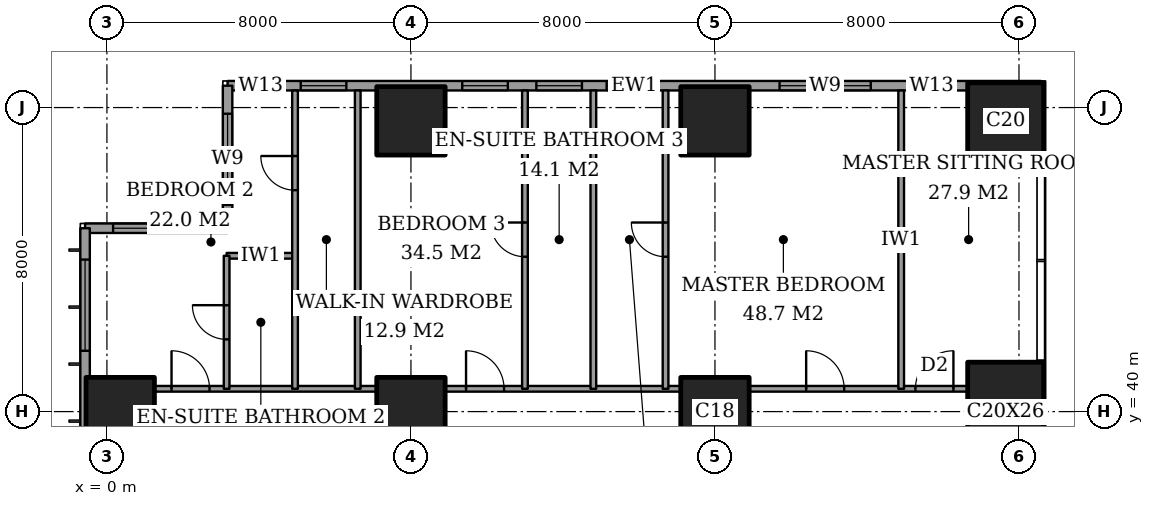
"""IFC4 building model, lengths in metres.
Left out: names, types, materials, properties, quantities, classifications, styles, units other than length and angle.
Written with IfcOpenShell. Run it as: python <this file> out.ifc"""

import sys

from ifc_helpers import new_model, si_unit, direction, frame, frame_2d, origin, origin_2d, place, context, subcontext, project, spatial, rectangle, extrude, element, fill, save


model = new_model("IFC4")
c1 = context("Model", 3, precision=1e-05, world=origin(), true_north=direction((0.0, 1.0)))
c2 = subcontext(c1, "Body", "Model", "MODEL_VIEW")
j1 = project(units=[si_unit("LENGTHUNIT", "METRE"), si_unit("PLANEANGLEUNIT", "RADIAN")], contexts=[c1])
p1 = place(None, origin())
s1 = spatial("IfcSite", under=j1, at=p1, CompositionType="ELEMENT")
p2 = place(p1, origin())
s2 = spatial("IfcBuilding", under=s1, at=p2, CompositionType="ELEMENT")
p3 = place(p2, frame((0.0, 0.0, 211.0)))
s3 = spatial("IfcBuildingStorey", under=s2, at=p3, CompositionType="ELEMENT", Elevation=211.0)
for number, where, z_axis, x_axis in (
    (1, (0.35, 40.0, 0.0), (0.0, 0.0, 1.0), (1.0, 0.0, 0.0)),
    (2, (8.0, 40.0, 0.0), (0.0, 0.0, 1.0), (1.0, 0.0, 0.0)),
    (3, (8.0, 47.65, 0.0), (0.0, 0.0, 1.0), (1.0, 0.0, 0.0)),
    (4, (16.0, 40.0, 0.0), (0.0, 0.0, 1.0), (1.0, 0.0, 0.0)),
    (5, (16.0, 47.65, 0.0), (0.0, 0.0, 1.0), (1.0, 0.0, 0.0)),
):
    element("IfcColumn", number, at=place(p3, frame(where, z_axis=z_axis, x_axis=x_axis)), inside=s3, PredefinedType="COLUMN", context=c2, shape_type="SweptSolid", body=[
        extrude(rectangle(XDim=1.8, YDim=1.8, at=origin_2d()), origin(), (0.0, 0.0, 1.0), 3.6),
    ])
p4 = place(p3, frame((23.65, 40.0, 0.0), z_axis=(0.0, 0.0, 1.0), x_axis=(1.0, 0.0, 0.0)))
e6 = element("IfcColumn", 6, at=p4, inside=s3, PredefinedType="COLUMN", context=c2, shape_type="SweptSolid", body=[
    extrude(rectangle(XDim=2.0, YDim=2.6, at=origin_2d()), origin(), (0.0, 0.0, 1.0), 3.6),
])
p5 = place(p3, frame((23.65, 47.65, 0.0), z_axis=(0.0, 0.0, 1.0), x_axis=(1.0, 0.0, 0.0)))
e7 = element("IfcColumn", 7, at=p5, inside=s3, PredefinedType="COLUMN", context=c2, shape_type="SweptSolid", body=[
    extrude(rectangle(XDim=2.0, YDim=2.0, at=origin_2d()), origin(), (0.0, 0.0, 1.0), 3.6),
])
p6 = place(p3, frame((24.575, 48.575, 0.0), z_axis=(0.0, 0.0, 1.0), x_axis=(-1.0, 0.0, 0.0)))
e8 = element("IfcWall", 8, at=p6, inside=s3, PredefinedType="SOLIDWALL", context=c2, shape_type="SweptSolid", body=[
    extrude(rectangle(XDim=21.4, YDim=0.25, at=frame_2d((10.7, 0.0))), origin(), (0.0, 0.0, 1.0), 3.6),
])
p7 = place(p6, frame((2.275, 0.0, 0.2)))
e9 = element("IfcOpeningElement", 9, at=p7, cuts=e8, PredefinedType="OPENING", context=c2, shape_type="SweptSolid", body=[
    extrude(rectangle(XDim=1.2, YDim=2.4, at=frame_2d((0.6, 1.2))), frame((0.0, 0.135, 0.0), z_axis=(0.0, -1.0, 0.0), x_axis=(1.0, 0.0, 0.0)), (0.0, 0.0, 1.0), 0.27),
])
p8 = place(p6, frame((4.475, 0.0, 0.2)))
e10 = element("IfcOpeningElement", 10, at=p8, cuts=e8, PredefinedType="OPENING", context=c2, shape_type="SweptSolid", body=[
    extrude(rectangle(XDim=2.4, YDim=2.4, at=frame_2d((1.2, 1.2))), frame((0.0, 0.135, 0.0), z_axis=(0.0, -1.0, 0.0), x_axis=(1.0, 0.0, 0.0)), (0.0, 0.0, 1.0), 0.27),
])
p9 = place(p6, frame((10.225, 0.0, 0.2)))
e11 = element("IfcOpeningElement", 11, at=p9, cuts=e8, PredefinedType="OPENING", context=c2, shape_type="SweptSolid", body=[
    extrude(rectangle(XDim=1.2, YDim=2.4, at=frame_2d((0.6, 1.2))), frame((0.0, 0.135, 0.0), z_axis=(0.0, -1.0, 0.0), x_axis=(1.0, 0.0, 0.0)), (0.0, 0.0, 1.0), 0.27),
])
p10 = place(p6, frame((12.075, 0.0, 0.2)))
e12 = element("IfcOpeningElement", 12, at=p10, cuts=e8, PredefinedType="OPENING", context=c2, shape_type="SweptSolid", body=[
    extrude(rectangle(XDim=1.2, YDim=2.4, at=frame_2d((0.6, 1.2))), frame((0.0, 0.135, 0.0), z_axis=(0.0, -1.0, 0.0), x_axis=(1.0, 0.0, 0.0)), (0.0, 0.0, 1.0), 0.27),
])
p11 = place(p6, frame((14.025, 0.0, 0.2)))
e13 = element("IfcOpeningElement", 13, at=p11, cuts=e8, PredefinedType="OPENING", context=c2, shape_type="SweptSolid", body=[
    extrude(rectangle(XDim=1.2, YDim=2.4, at=frame_2d((0.6, 1.2))), frame((0.0, 0.135, 0.0), z_axis=(0.0, -1.0, 0.0), x_axis=(1.0, 0.0, 0.0)), (0.0, 0.0, 1.0), 0.27),
])
p12 = place(p6, frame((18.275, 0.0, 0.2)))
e14 = element("IfcOpeningElement", 14, at=p12, cuts=e8, PredefinedType="OPENING", context=c2, shape_type="SweptSolid", body=[
    extrude(rectangle(XDim=1.2, YDim=2.4, at=frame_2d((0.6, 1.2))), frame((0.0, 0.135, 0.0), z_axis=(0.0, -1.0, 0.0), x_axis=(1.0, 0.0, 0.0)), (0.0, 0.0, 1.0), 0.27),
])
p13 = place(p6, frame((19.925, 0.0, 0.2)))
e15 = element("IfcOpeningElement", 15, at=p13, cuts=e8, PredefinedType="OPENING", context=c2, shape_type="SweptSolid", body=[
    extrude(rectangle(XDim=1.2, YDim=2.4, at=frame_2d((0.6, 1.2))), frame((0.0, 0.135, 0.0), z_axis=(0.0, -1.0, 0.0), x_axis=(1.0, 0.0, 0.0)), (0.0, 0.0, 1.0), 0.27),
])
p14 = place(p3, frame((3.175, 48.575, 0.0), z_axis=(0.0, 0.0, 1.0), x_axis=(0.0, -1.0, 0.0)))
e16 = element("IfcWall", 16, at=p14, inside=s3, PredefinedType="SOLIDWALL", context=c2, shape_type="SweptSolid", body=[
    extrude(rectangle(XDim=3.75, YDim=0.25, at=frame_2d((1.875, 0.0))), origin(), (0.0, 0.0, 1.0), 3.6),
])
p15 = place(p14, frame((0.738, 0.0, 0.2)))
e17 = element("IfcOpeningElement", 17, at=p15, cuts=e16, PredefinedType="OPENING", context=c2, shape_type="SweptSolid", body=[
    extrude(rectangle(XDim=2.4, YDim=2.4, at=frame_2d((1.2, 1.2))), frame((0.0, 0.135, 0.0), z_axis=(0.0, -1.0, 0.0), x_axis=(1.0, 0.0, 0.0)), (0.0, 0.0, 1.0), 0.27),
])
p16 = place(p3, frame((3.175, 44.825, 0.0), z_axis=(0.0, 0.0, 1.0), x_axis=(-1.0, 0.0, 0.0)))
e18 = element("IfcWall", 18, at=p16, inside=s3, PredefinedType="SOLIDWALL", context=c2, shape_type="SweptSolid", body=[
    extrude(rectangle(XDim=3.75, YDim=0.25, at=frame_2d((1.875, 0.0))), origin(), (0.0, 0.0, 1.0), 3.6),
])
p17 = place(p16, frame((0.613, 0.0, 0.2)))
e19 = element("IfcOpeningElement", 19, at=p17, cuts=e18, PredefinedType="OPENING", context=c2, shape_type="SweptSolid", body=[
    extrude(rectangle(XDim=2.4, YDim=2.4, at=frame_2d((1.2, 1.2))), frame((0.0, 0.135, 0.0), z_axis=(0.0, -1.0, 0.0), x_axis=(1.0, 0.0, 0.0)), (0.0, 0.0, 1.0), 0.27),
])
p18 = place(p3, frame((-0.575, 44.825, 0.0), z_axis=(0.0, 0.0, 1.0), x_axis=(0.0, -1.0, 0.0)))
e20 = element("IfcWall", 20, at=p18, inside=s3, PredefinedType="SOLIDWALL", context=c2, shape_type="SweptSolid", body=[
    extrude(rectangle(XDim=41.65, YDim=0.25, at=frame_2d((20.825, 0.0))), origin(), (0.0, 0.0, 1.0), 3.6),
])
p19 = place(p18, frame((0.825, 0.0, 0.2)))
e21 = element("IfcOpeningElement", 21, at=p19, cuts=e20, PredefinedType="OPENING", context=c2, shape_type="SweptSolid", body=[
    extrude(rectangle(XDim=2.4, YDim=2.4, at=frame_2d((1.2, 1.2))), frame((0.0, 0.135, 0.0), z_axis=(0.0, -1.0, 0.0), x_axis=(1.0, 0.0, 0.0)), (0.0, 0.0, 1.0), 0.27),
])
p20 = place(p18, frame((6.05, 0.0, 0.2)))
e22 = element("IfcOpeningElement", 22, at=p20, cuts=e20, PredefinedType="OPENING", context=c2, shape_type="SweptSolid", body=[
    extrude(rectangle(XDim=1.2, YDim=2.4, at=frame_2d((0.6, 1.2))), frame((0.0, 0.135, 0.0), z_axis=(0.0, -1.0, 0.0), x_axis=(1.0, 0.0, 0.0)), (0.0, 0.0, 1.0), 0.27),
])
p21 = place(p18, frame((8.225, 0.0, 0.2)))
e23 = element("IfcOpeningElement", 23, at=p21, cuts=e20, PredefinedType="OPENING", context=c2, shape_type="SweptSolid", body=[
    extrude(rectangle(XDim=2.4, YDim=2.4, at=frame_2d((1.2, 1.2))), frame((0.0, 0.135, 0.0), z_axis=(0.0, -1.0, 0.0), x_axis=(1.0, 0.0, 0.0)), (0.0, 0.0, 1.0), 0.27),
])
p22 = place(p18, frame((15.625, 0.0, 0.2)))
e24 = element("IfcOpeningElement", 24, at=p22, cuts=e20, PredefinedType="OPENING", context=c2, shape_type="SweptSolid", body=[
    extrude(rectangle(XDim=2.4, YDim=2.4, at=frame_2d((1.2, 1.2))), frame((0.0, 0.135, 0.0), z_axis=(0.0, -1.0, 0.0), x_axis=(1.0, 0.0, 0.0)), (0.0, 0.0, 1.0), 0.27),
])
p23 = place(p18, frame((23.625, 0.0, 0.2)))
e25 = element("IfcOpeningElement", 25, at=p23, cuts=e20, PredefinedType="OPENING", context=c2, shape_type="SweptSolid", body=[
    extrude(rectangle(XDim=2.4, YDim=2.4, at=frame_2d((1.2, 1.2))), frame((0.0, 0.135, 0.0), z_axis=(0.0, -1.0, 0.0), x_axis=(1.0, 0.0, 0.0)), (0.0, 0.0, 1.0), 0.27),
])
p24 = place(p18, frame((30.775, 0.0, 0.2)))
e26 = element("IfcOpeningElement", 26, at=p24, cuts=e20, PredefinedType="OPENING", context=c2, shape_type="SweptSolid", body=[
    extrude(rectangle(XDim=2.4, YDim=2.4, at=frame_2d((1.2, 1.2))), frame((0.0, 0.135, 0.0), z_axis=(0.0, -1.0, 0.0), x_axis=(1.0, 0.0, 0.0)), (0.0, 0.0, 1.0), 0.27),
])
p25 = place(p18, frame((34.55, 0.0, 0.2)))
e27 = element("IfcOpeningElement", 27, at=p25, cuts=e20, PredefinedType="OPENING", context=c2, shape_type="SweptSolid", body=[
    extrude(rectangle(XDim=1.2, YDim=2.4, at=frame_2d((0.6, 1.2))), frame((0.0, 0.135, 0.0), z_axis=(0.0, -1.0, 0.0), x_axis=(1.0, 0.0, 0.0)), (0.0, 0.0, 1.0), 0.27),
])
p26 = place(p18, frame((38.425, 0.0, 0.2)))
e28 = element("IfcOpeningElement", 28, at=p26, cuts=e20, PredefinedType="OPENING", context=c2, shape_type="SweptSolid", body=[
    extrude(rectangle(XDim=2.4, YDim=2.4, at=frame_2d((1.2, 1.2))), frame((0.0, 0.135, 0.0), z_axis=(0.0, -1.0, 0.0), x_axis=(1.0, 0.0, 0.0)), (0.0, 0.0, 1.0), 0.27),
])
p27 = place(p3, frame((1.25, 40.6, 0.0), z_axis=(0.0, 0.0, 1.0), x_axis=(1.0, 0.0, 0.0)))
e29 = element("IfcWall", 29, at=p27, inside=s3, PredefinedType="PARTITIONING", context=c2, shape_type="SweptSolid", body=[
    extrude(rectangle(XDim=5.85, YDim=0.15, at=frame_2d((2.925, 0.0))), origin(), (0.0, 0.0, 1.0), 3.35),
])
p28 = place(p27, frame((0.45, 0.0, 0.0)))
e30 = element("IfcOpeningElement", 30, at=p28, cuts=e29, PredefinedType="OPENING", context=c2, shape_type="SweptSolid", body=[
    extrude(rectangle(XDim=1.0, YDim=2.1, at=frame_2d((0.5, 1.05))), frame((0.0, 0.085, 0.0), z_axis=(0.0, -1.0, 0.0), x_axis=(1.0, 0.0, 0.0)), (0.0, 0.0, 1.0), 0.17),
])
p29 = place(p3, frame((8.9, 40.6, 0.0), z_axis=(0.0, 0.0, 1.0), x_axis=(1.0, 0.0, 0.0)))
e31 = element("IfcWall", 31, at=p29, inside=s3, PredefinedType="PARTITIONING", context=c2, shape_type="SweptSolid", body=[
    extrude(rectangle(XDim=6.2, YDim=0.15, at=frame_2d((3.1, 0.0))), origin(), (0.0, 0.0, 1.0), 3.35),
])
p30 = place(p29, frame((0.55, 0.0, 0.0)))
e32 = element("IfcOpeningElement", 32, at=p30, cuts=e31, PredefinedType="OPENING", context=c2, shape_type="SweptSolid", body=[
    extrude(rectangle(XDim=1.0, YDim=2.1, at=frame_2d((0.5, 1.05))), frame((0.0, 0.085, 0.0), z_axis=(0.0, -1.0, 0.0), x_axis=(1.0, 0.0, 0.0)), (0.0, 0.0, 1.0), 0.17),
])
p31 = place(p3, frame((16.9, 40.6, 0.0), z_axis=(0.0, 0.0, 1.0), x_axis=(1.0, 0.0, 0.0)))
e33 = element("IfcWall", 33, at=p31, inside=s3, PredefinedType="PARTITIONING", context=c2, shape_type="SweptSolid", body=[
    extrude(rectangle(XDim=5.75, YDim=0.15, at=frame_2d((2.875, 0.0))), origin(), (0.0, 0.0, 1.0), 3.35),
])
p32 = place(p31, frame((1.5, 0.0, 0.0)))
e34 = element("IfcOpeningElement", 34, at=p32, cuts=e33, PredefinedType="OPENING", context=c2, shape_type="SweptSolid", body=[
    extrude(rectangle(XDim=1.0, YDim=2.1, at=frame_2d((0.5, 1.05))), frame((0.0, 0.085, 0.0), z_axis=(0.0, -1.0, 0.0), x_axis=(1.0, 0.0, 0.0)), (0.0, 0.0, 1.0), 0.17),
])
p33 = place(p31, frame((4.375, 0.0, 0.0)))
e35 = element("IfcOpeningElement", 35, at=p33, cuts=e33, PredefinedType="OPENING", context=c2, shape_type="SweptSolid", body=[
    extrude(rectangle(XDim=1.0, YDim=2.1, at=frame_2d((0.5, 1.05))), frame((0.0, 0.085, 0.0), z_axis=(0.0, -1.0, 0.0), x_axis=(1.0, 0.0, 0.0)), (0.0, 0.0, 1.0), 0.17),
])
p34 = place(p3, frame((3.15, 44.1, 0.0), z_axis=(0.0, 0.0, 1.0), x_axis=(1.0, 0.0, 0.0)))
e36 = element("IfcWall", 36, at=p34, inside=s3, PredefinedType="PARTITIONING", context=c2, shape_type="SweptSolid", body=[
    extrude(rectangle(XDim=1.8, YDim=0.15, at=frame_2d((0.9, 0.0))), origin(), (0.0, 0.0, 1.0), 3.35),
])
p35 = place(p3, frame((3.15, 40.6, 0.0), z_axis=(0.0, 0.0, 1.0), x_axis=(0.0, 1.0, 0.0)))
e37 = element("IfcWall", 37, at=p35, inside=s3, PredefinedType="PARTITIONING", context=c2, shape_type="SweptSolid", body=[
    extrude(rectangle(XDim=3.5, YDim=0.15, at=frame_2d((1.75, 0.0))), origin(), (0.0, 0.0, 1.0), 3.35),
])
p36 = place(p35, frame((1.3, 0.0, 0.0)))
e38 = element("IfcOpeningElement", 38, at=p36, cuts=e37, PredefinedType="OPENING", context=c2, shape_type="SweptSolid", body=[
    extrude(rectangle(XDim=0.9, YDim=2.1, at=frame_2d((0.45, 1.05))), frame((0.0, 0.085, 0.0), z_axis=(0.0, -1.0, 0.0), x_axis=(1.0, 0.0, 0.0)), (0.0, 0.0, 1.0), 0.17),
])
p37 = place(p3, frame((4.95, 40.6, 0.0), z_axis=(0.0, 0.0, 1.0), x_axis=(0.0, 1.0, 0.0)))
e39 = element("IfcWall", 39, at=p37, inside=s3, PredefinedType="PARTITIONING", context=c2, shape_type="SweptSolid", body=[
    extrude(rectangle(XDim=7.85, YDim=0.15, at=frame_2d((3.925, 0.0))), origin(), (0.0, 0.0, 1.0), 3.35),
])
p38 = place(p37, frame((5.225, 0.0, 0.0)))
e40 = element("IfcOpeningElement", 40, at=p38, cuts=e39, PredefinedType="OPENING", context=c2, shape_type="SweptSolid", body=[
    extrude(rectangle(XDim=0.9, YDim=2.1, at=frame_2d((0.45, 1.05))), frame((0.0, 0.085, 0.0), z_axis=(0.0, -1.0, 0.0), x_axis=(1.0, 0.0, 0.0)), (0.0, 0.0, 1.0), 0.17),
])
p39 = place(p3, frame((6.6, 40.6, 0.0), z_axis=(0.0, 0.0, 1.0), x_axis=(0.0, 1.0, 0.0)))
e41 = element("IfcWall", 41, at=p39, inside=s3, PredefinedType="PARTITIONING", context=c2, shape_type="SweptSolid", body=[
    extrude(rectangle(XDim=7.85, YDim=0.15, at=frame_2d((3.925, 0.0))), origin(), (0.0, 0.0, 1.0), 3.35),
])
p40 = place(p3, frame((11.0, 40.6, 0.0), z_axis=(0.0, 0.0, 1.0), x_axis=(0.0, 1.0, 0.0)))
e42 = element("IfcWall", 42, at=p40, inside=s3, PredefinedType="PARTITIONING", context=c2, shape_type="SweptSolid", body=[
    extrude(rectangle(XDim=7.85, YDim=0.15, at=frame_2d((3.925, 0.0))), origin(), (0.0, 0.0, 1.0), 3.35),
])
p41 = place(p40, frame((3.475, 0.0, 0.0)))
e43 = element("IfcOpeningElement", 43, at=p41, cuts=e42, PredefinedType="OPENING", context=c2, shape_type="SweptSolid", body=[
    extrude(rectangle(XDim=0.9, YDim=2.1, at=frame_2d((0.45, 1.05))), frame((0.0, 0.085, 0.0), z_axis=(0.0, -1.0, 0.0), x_axis=(1.0, 0.0, 0.0)), (0.0, 0.0, 1.0), 0.17),
])
p42 = place(p3, frame((12.8, 40.6, 0.0), z_axis=(0.0, 0.0, 1.0), x_axis=(0.0, 1.0, 0.0)))
e44 = element("IfcWall", 44, at=p42, inside=s3, PredefinedType="PARTITIONING", context=c2, shape_type="SweptSolid", body=[
    extrude(rectangle(XDim=7.85, YDim=0.15, at=frame_2d((3.925, 0.0))), origin(), (0.0, 0.0, 1.0), 3.35),
])
p43 = place(p3, frame((14.7, 40.6, 0.0), z_axis=(0.0, 0.0, 1.0), x_axis=(0.0, 1.0, 0.0)))
e45 = element("IfcWall", 45, at=p43, inside=s3, PredefinedType="PARTITIONING", context=c2, shape_type="SweptSolid", body=[
    extrude(rectangle(XDim=7.85, YDim=0.15, at=frame_2d((3.925, 0.0))), origin(), (0.0, 0.0, 1.0), 3.35),
])
p44 = place(p43, frame((3.475, 0.0, 0.0)))
e46 = element("IfcOpeningElement", 46, at=p44, cuts=e45, PredefinedType="OPENING", context=c2, shape_type="SweptSolid", body=[
    extrude(rectangle(XDim=0.9, YDim=2.1, at=frame_2d((0.45, 1.05))), frame((0.0, 0.085, 0.0), z_axis=(0.0, -1.0, 0.0), x_axis=(1.0, 0.0, 0.0)), (0.0, 0.0, 1.0), 0.17),
])
p45 = place(p3, frame((20.9, 40.6, 0.0), z_axis=(0.0, 0.0, 1.0), x_axis=(0.0, 1.0, 0.0)))
e47 = element("IfcWall", 47, at=p45, inside=s3, PredefinedType="PARTITIONING", context=c2, shape_type="SweptSolid", body=[
    extrude(rectangle(XDim=7.85, YDim=0.15, at=frame_2d((3.925, 0.0))), origin(), (0.0, 0.0, 1.0), 3.35),
])
p46 = place(p7, origin())
e48 = element("IfcWindow", 48, at=p46, inside=s3, PartitioningType="SINGLE_PANEL", PredefinedType="WINDOW", context=c2, shape_type="SweptSolid", body=[
    extrude(rectangle(XDim=1.2, YDim=2.4, at=frame_2d((0.6, 1.2))), frame((0.0, 0.03, 0.0), z_axis=(0.0, -1.0, 0.0), x_axis=(1.0, 0.0, 0.0)), (0.0, 0.0, 1.0), 0.06),
])
fill(e9, e48)
p47 = place(p8, origin())
e49 = element("IfcWindow", 49, at=p47, inside=s3, PartitioningType="SINGLE_PANEL", PredefinedType="WINDOW", context=c2, shape_type="SweptSolid", body=[
    extrude(rectangle(XDim=2.4, YDim=2.4, at=frame_2d((1.2, 1.2))), frame((0.0, 0.03, 0.0), z_axis=(0.0, -1.0, 0.0), x_axis=(1.0, 0.0, 0.0)), (0.0, 0.0, 1.0), 0.06),
])
fill(e10, e49)
p48 = place(p9, origin())
e50 = element("IfcWindow", 50, at=p48, inside=s3, PartitioningType="SINGLE_PANEL", PredefinedType="WINDOW", context=c2, shape_type="SweptSolid", body=[
    extrude(rectangle(XDim=1.2, YDim=2.4, at=frame_2d((0.6, 1.2))), frame((0.0, 0.03, 0.0), z_axis=(0.0, -1.0, 0.0), x_axis=(1.0, 0.0, 0.0)), (0.0, 0.0, 1.0), 0.06),
])
fill(e11, e50)
p49 = place(p10, origin())
e51 = element("IfcWindow", 51, at=p49, inside=s3, PartitioningType="SINGLE_PANEL", PredefinedType="WINDOW", context=c2, shape_type="SweptSolid", body=[
    extrude(rectangle(XDim=1.2, YDim=2.4, at=frame_2d((0.6, 1.2))), frame((0.0, 0.03, 0.0), z_axis=(0.0, -1.0, 0.0), x_axis=(1.0, 0.0, 0.0)), (0.0, 0.0, 1.0), 0.06),
])
fill(e12, e51)
p50 = place(p11, origin())
e52 = element("IfcWindow", 52, at=p50, inside=s3, PartitioningType="SINGLE_PANEL", PredefinedType="WINDOW", context=c2, shape_type="SweptSolid", body=[
    extrude(rectangle(XDim=1.2, YDim=2.4, at=frame_2d((0.6, 1.2))), frame((0.0, 0.03, 0.0), z_axis=(0.0, -1.0, 0.0), x_axis=(1.0, 0.0, 0.0)), (0.0, 0.0, 1.0), 0.06),
])
fill(e13, e52)
p51 = place(p12, origin())
e53 = element("IfcWindow", 53, at=p51, inside=s3, PartitioningType="SINGLE_PANEL", PredefinedType="WINDOW", context=c2, shape_type="SweptSolid", body=[
    extrude(rectangle(XDim=1.2, YDim=2.4, at=frame_2d((0.6, 1.2))), frame((0.0, 0.03, 0.0), z_axis=(0.0, -1.0, 0.0), x_axis=(1.0, 0.0, 0.0)), (0.0, 0.0, 1.0), 0.06),
])
fill(e14, e53)
p52 = place(p13, origin())
e54 = element("IfcWindow", 54, at=p52, inside=s3, PartitioningType="SINGLE_PANEL", PredefinedType="WINDOW", context=c2, shape_type="SweptSolid", body=[
    extrude(rectangle(XDim=1.2, YDim=2.4, at=frame_2d((0.6, 1.2))), frame((0.0, 0.03, 0.0), z_axis=(0.0, -1.0, 0.0), x_axis=(1.0, 0.0, 0.0)), (0.0, 0.0, 1.0), 0.06),
])
fill(e15, e54)
p53 = place(p15, origin())
e55 = element("IfcWindow", 55, at=p53, inside=s3, PartitioningType="SINGLE_PANEL", PredefinedType="WINDOW", context=c2, shape_type="SweptSolid", body=[
    extrude(rectangle(XDim=2.4, YDim=2.4, at=frame_2d((1.2, 1.2))), frame((0.0, 0.03, 0.0), z_axis=(0.0, -1.0, 0.0), x_axis=(1.0, 0.0, 0.0)), (0.0, 0.0, 1.0), 0.06),
])
fill(e17, e55)
p54 = place(p17, origin())
e56 = element("IfcWindow", 56, at=p54, inside=s3, PartitioningType="SINGLE_PANEL", PredefinedType="WINDOW", context=c2, shape_type="SweptSolid", body=[
    extrude(rectangle(XDim=2.4, YDim=2.4, at=frame_2d((1.2, 1.2))), frame((0.0, 0.03, 0.0), z_axis=(0.0, -1.0, 0.0), x_axis=(1.0, 0.0, 0.0)), (0.0, 0.0, 1.0), 0.06),
])
fill(e19, e56)
p55 = place(p19, origin())
e57 = element("IfcWindow", 57, at=p55, inside=s3, PartitioningType="SINGLE_PANEL", PredefinedType="WINDOW", context=c2, shape_type="SweptSolid", body=[
    extrude(rectangle(XDim=2.4, YDim=2.4, at=frame_2d((1.2, 1.2))), frame((0.0, 0.03, 0.0), z_axis=(0.0, -1.0, 0.0), x_axis=(1.0, 0.0, 0.0)), (0.0, 0.0, 1.0), 0.06),
])
fill(e21, e57)
p56 = place(p36, origin())
e58 = element("IfcDoor", 58, at=p56, inside=s3, OperationType="SINGLE_SWING_LEFT", PredefinedType="DOOR", context=c2, shape_type="SweptSolid", body=[
    extrude(rectangle(XDim=0.9, YDim=2.1, at=frame_2d((0.45, 1.05))), frame((0.0, 0.025, 0.0), z_axis=(0.0, -1.0, 0.0), x_axis=(1.0, 0.0, 0.0)), (0.0, 0.0, 1.0), 0.05),
])
fill(e38, e58)
p57 = place(p28, origin())
e59 = element("IfcDoor", 59, at=p57, inside=s3, OperationType="SINGLE_SWING_RIGHT", PredefinedType="DOOR", context=c2, shape_type="SweptSolid", body=[
    extrude(rectangle(XDim=1.0, YDim=2.1, at=frame_2d((0.5, 1.05))), frame((0.0, 0.025, 0.0), z_axis=(0.0, -1.0, 0.0), x_axis=(1.0, 0.0, 0.0)), (0.0, 0.0, 1.0), 0.05),
])
fill(e30, e59)
p58 = place(p38, origin())
e60 = element("IfcDoor", 60, at=p58, inside=s3, OperationType="SINGLE_SWING_LEFT", PredefinedType="DOOR", context=c2, shape_type="SweptSolid", body=[
    extrude(rectangle(XDim=0.9, YDim=2.1, at=frame_2d((0.45, 1.05))), frame((0.0, 0.025, 0.0), z_axis=(0.0, -1.0, 0.0), x_axis=(1.0, 0.0, 0.0)), (0.0, 0.0, 1.0), 0.05),
])
fill(e40, e60)
p59 = place(p30, origin())
e61 = element("IfcDoor", 61, at=p59, inside=s3, OperationType="SINGLE_SWING_RIGHT", PredefinedType="DOOR", context=c2, shape_type="SweptSolid", body=[
    extrude(rectangle(XDim=1.0, YDim=2.1, at=frame_2d((0.5, 1.05))), frame((0.0, 0.025, 0.0), z_axis=(0.0, -1.0, 0.0), x_axis=(1.0, 0.0, 0.0)), (0.0, 0.0, 1.0), 0.05),
])
fill(e32, e61)
p60 = place(p41, origin())
e62 = element("IfcDoor", 62, at=p60, inside=s3, OperationType="SINGLE_SWING_LEFT", PredefinedType="DOOR", context=c2, shape_type="SweptSolid", body=[
    extrude(rectangle(XDim=0.9, YDim=2.1, at=frame_2d((0.45, 1.05))), frame((0.0, 0.025, 0.0), z_axis=(0.0, -1.0, 0.0), x_axis=(1.0, 0.0, 0.0)), (0.0, 0.0, 1.0), 0.05),
])
fill(e43, e62)
p61 = place(p44, origin())
e63 = element("IfcDoor", 63, at=p61, inside=s3, OperationType="SINGLE_SWING_LEFT", PredefinedType="DOOR", context=c2, shape_type="SweptSolid", body=[
    extrude(rectangle(XDim=0.9, YDim=2.1, at=frame_2d((0.45, 1.05))), frame((0.0, 0.025, 0.0), z_axis=(0.0, -1.0, 0.0), x_axis=(1.0, 0.0, 0.0)), (0.0, 0.0, 1.0), 0.05),
])
fill(e46, e63)
p62 = place(p32, origin())
e64 = element("IfcDoor", 64, at=p62, inside=s3, OperationType="SINGLE_SWING_RIGHT", PredefinedType="DOOR", context=c2, shape_type="SweptSolid", body=[
    extrude(rectangle(XDim=1.0, YDim=2.1, at=frame_2d((0.5, 1.05))), frame((0.0, 0.025, 0.0), z_axis=(0.0, -1.0, 0.0), x_axis=(1.0, 0.0, 0.0)), (0.0, 0.0, 1.0), 0.05),
])
fill(e34, e64)
p63 = place(p33, origin())
e65 = element("IfcDoor", 65, at=p63, inside=s3, OperationType="SINGLE_SWING_LEFT", PredefinedType="DOOR", context=c2, shape_type="SweptSolid", body=[
    extrude(rectangle(XDim=1.0, YDim=2.1, at=frame_2d((0.5, 1.05))), frame((0.0, 0.025, 0.0), z_axis=(0.0, -1.0, 0.0), x_axis=(1.0, 0.0, 0.0)), (0.0, 0.0, 1.0), 0.05),
])
fill(e35, e65)
save(model, sys.argv[1])
